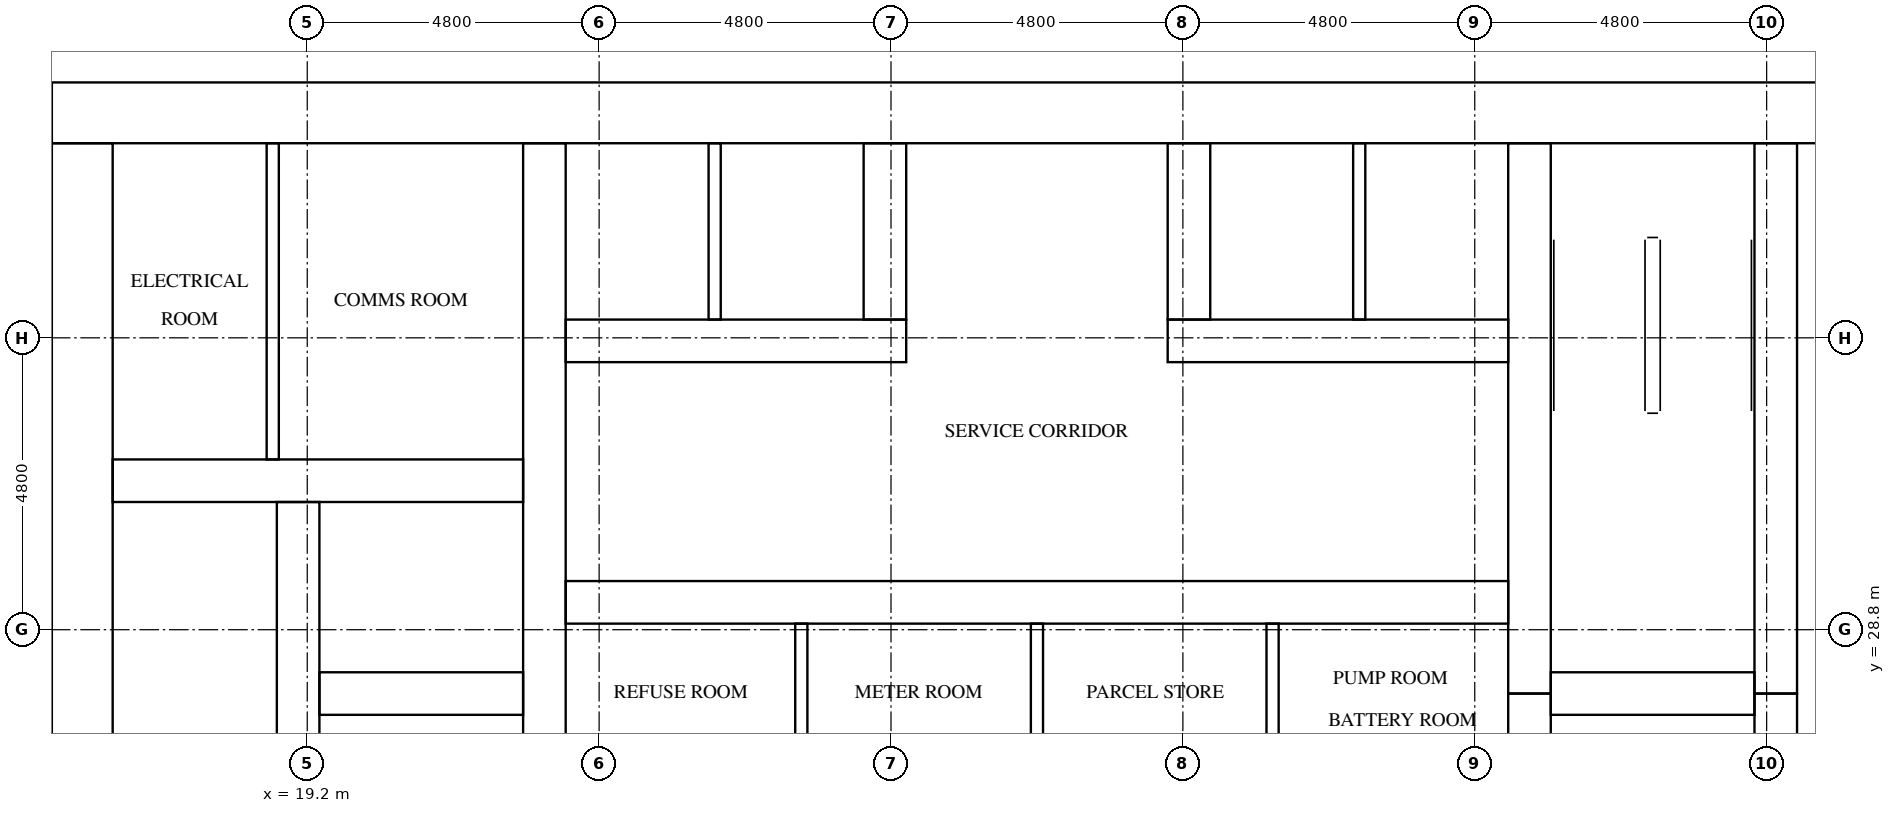
"""IFC4 building model, lengths in metres.
Left out: names, types, materials, properties, quantities, classifications, styles, units other than length and angle.
Written with IfcOpenShell. Run it as: python <this file> out.ifc"""

import sys

from ifc_helpers import new_model, si_unit, direction, frame, frame_2d, origin, place, context, subcontext, project, spatial, rectangle, extrude, element, fill, save


model = new_model("IFC4")
c1 = context("Model", 3, precision=1e-05, world=origin(), true_north=direction((0.0, 1.0)))
c2 = subcontext(c1, "Body", "Model", "MODEL_VIEW")
j1 = project(units=[si_unit("LENGTHUNIT", "METRE"), si_unit("PLANEANGLEUNIT", "RADIAN")], contexts=[c1])
p1 = place(None, origin())
s1 = spatial("IfcSite", under=j1, at=p1, CompositionType="ELEMENT")
p2 = place(p1, origin())
s2 = spatial("IfcBuilding", under=s1, at=p2, CompositionType="ELEMENT")
p3 = place(p2, frame((0.0, 0.0, 36.4)))
s3 = spatial("IfcBuildingStorey", under=s2, at=p3, CompositionType="ELEMENT", Elevation=36.4)
p4 = place(p3, frame((15.0, 37.3, 0.0), z_axis=(0.0, 0.0, 1.0), x_axis=(1.0, 0.0, 0.0)))
e1 = element("IfcWall", 1, at=p4, inside=s3, PredefinedType="SHEAR", context=c2, shape_type="SweptSolid", body=[
    extrude(rectangle(XDim=32.4, YDim=1.0, at=frame_2d((16.2, 0.0))), origin(), (0.0, 0.0, 1.0), 3.2),
])
p5 = place(p4, frame((15.3, 0.0, 0.0)))
e2 = element("IfcOpeningElement", 2, at=p5, cuts=e1, PredefinedType="OPENING", context=c2, shape_type="SweptSolid", body=[
    extrude(rectangle(XDim=1.8, YDim=2.1, at=frame_2d((0.9, 1.05))), frame((0.0, 0.51, 0.0), z_axis=(0.0, -1.0, 0.0), x_axis=(1.0, 0.0, 0.0)), (0.0, 0.0, 1.0), 1.02),
])
p6 = place(p4, frame((1.766, 0.0, 0.0)))
e3 = element("IfcOpeningElement", 3, at=p6, cuts=e1, PredefinedType="OPENING", context=c2, shape_type="SweptSolid", body=[
    extrude(rectangle(XDim=1.0, YDim=2.1, at=frame_2d((0.5, 1.05))), frame((0.0, 0.51, 0.0), z_axis=(0.0, -1.0, 0.0), x_axis=(1.0, 0.0, 0.0)), (0.0, 0.0, 1.0), 1.02),
])
p7 = place(p4, frame((5.241, 0.0, 0.0)))
e4 = element("IfcOpeningElement", 4, at=p7, cuts=e1, PredefinedType="OPENING", context=c2, shape_type="SweptSolid", body=[
    extrude(rectangle(XDim=1.0, YDim=2.1, at=frame_2d((0.5, 1.05))), frame((0.0, 0.51, 0.0), z_axis=(0.0, -1.0, 0.0), x_axis=(1.0, 0.0, 0.0)), (0.0, 0.0, 1.0), 1.02),
])
p8 = place(p3, frame((15.5, 16.0, 0.0), z_axis=(0.0, 0.0, 1.0), x_axis=(0.0, 1.0, 0.0)))
e5 = element("IfcWall", 5, at=p8, inside=s3, PredefinedType="SHEAR", context=c2, shape_type="SweptSolid", body=[
    extrude(rectangle(XDim=20.8, YDim=1.0, at=frame_2d((10.4, 0.0))), origin(), (0.0, 0.0, 1.0), 3.2),
])
p9 = place(p8, frame((4.76, 0.0, 0.0)))
e6 = element("IfcOpeningElement", 6, at=p9, cuts=e5, PredefinedType="OPENING", context=c2, shape_type="SweptSolid", body=[
    extrude(rectangle(XDim=1.2, YDim=2.1, at=frame_2d((0.6, 1.05))), frame((0.0, 0.51, 0.0), z_axis=(0.0, -1.0, 0.0), x_axis=(1.0, 0.0, 0.0)), (0.0, 0.0, 1.0), 1.02),
])
p10 = place(p3, frame((19.05, 16.0, 0.0), z_axis=(0.0, 0.0, 1.0), x_axis=(0.0, 1.0, 0.0)))
e7 = element("IfcWall", 7, at=p10, inside=s3, PredefinedType="SHEAR", context=c2, shape_type="SweptSolid", body=[
    extrude(rectangle(XDim=14.9, YDim=0.7, at=frame_2d((7.45, 0.0))), origin(), (0.0, 0.0, 1.0), 3.2),
])
p11 = place(p10, frame((9.45, 0.0, 0.0)))
e8 = element("IfcOpeningElement", 8, at=p11, cuts=e7, PredefinedType="OPENING", context=c2, shape_type="SweptSolid", body=[
    extrude(rectangle(XDim=1.1, YDim=2.1, at=frame_2d((0.55, 1.05))), frame((0.0, 0.36, 0.0), z_axis=(0.0, -1.0, 0.0), x_axis=(1.0, 0.0, 0.0)), (0.0, 0.0, 1.0), 0.72),
])
p12 = place(p10, frame((12.95, 0.0, 0.0)))
e9 = element("IfcOpeningElement", 9, at=p12, cuts=e7, PredefinedType="OPENING", context=c2, shape_type="SweptSolid", body=[
    extrude(rectangle(XDim=1.1, YDim=2.1, at=frame_2d((0.55, 1.05))), frame((0.0, 0.36, 0.0), z_axis=(0.0, -1.0, 0.0), x_axis=(1.0, 0.0, 0.0)), (0.0, 0.0, 1.0), 0.72),
])
p13 = place(p10, frame((0.2, 0.0, 0.0)))
e10 = element("IfcOpeningElement", 10, at=p13, cuts=e7, PredefinedType="OPENING", context=c2, shape_type="SweptSolid", body=[
    extrude(rectangle(XDim=1.2, YDim=2.1, at=frame_2d((0.6, 1.05))), frame((0.0, 0.36, 0.0), z_axis=(0.0, -1.0, 0.0), x_axis=(1.0, 0.0, 0.0)), (0.0, 0.0, 1.0), 0.72),
])
p14 = place(p3, frame((23.1, 16.0, 0.0), z_axis=(0.0, 0.0, 1.0), x_axis=(0.0, 1.0, 0.0)))
e11 = element("IfcWall", 11, at=p14, inside=s3, PredefinedType="SHEAR", context=c2, shape_type="SweptSolid", body=[
    extrude(rectangle(XDim=20.8, YDim=0.7, at=frame_2d((10.4, 0.0))), origin(), (0.0, 0.0, 1.0), 3.2),
])
p15 = place(p3, frame((39.3, 24.25, 0.0), z_axis=(0.0, 0.0, 1.0), x_axis=(0.0, 1.0, 0.0)))
e12 = element("IfcWall", 12, at=p15, inside=s3, PredefinedType="SHEAR", context=c2, shape_type="SweptSolid", body=[
    extrude(rectangle(XDim=3.5, YDim=0.7, at=frame_2d((1.75, 0.0))), origin(), (0.0, 0.0, 1.0), 3.2),
])
p16 = place(p3, frame((39.3, 27.75, 0.0), z_axis=(0.0, 0.0, 1.0), x_axis=(0.0, 1.0, 0.0)))
e13 = element("IfcWall", 13, at=p16, inside=s3, PredefinedType="SHEAR", context=c2, shape_type="SweptSolid", body=[
    extrude(rectangle(XDim=9.05, YDim=0.7, at=frame_2d((4.525, 0.0))), origin(), (0.0, 0.0, 1.0), 3.2),
])
p17 = place(p3, frame((43.35, 24.25, 0.0), z_axis=(0.0, 0.0, 1.0), x_axis=(0.0, 1.0, 0.0)))
e14 = element("IfcWall", 14, at=p17, inside=s3, PredefinedType="SHEAR", context=c2, shape_type="SweptSolid", body=[
    extrude(rectangle(XDim=3.5, YDim=0.7, at=frame_2d((1.75, 0.0))), origin(), (0.0, 0.0, 1.0), 3.2),
])
p18 = place(p17, frame((1.2, 0.0, 0.0)))
e15 = element("IfcOpeningElement", 15, at=p18, cuts=e14, PredefinedType="OPENING", context=c2, shape_type="SweptSolid", body=[
    extrude(rectangle(XDim=1.1, YDim=2.1, at=frame_2d((0.55, 1.05))), frame((0.0, 0.36, 0.0), z_axis=(0.0, -1.0, 0.0), x_axis=(1.0, 0.0, 0.0)), (0.0, 0.0, 1.0), 0.72),
])
p19 = place(p3, frame((43.35, 27.75, 0.0), z_axis=(0.0, 0.0, 1.0), x_axis=(0.0, 1.0, 0.0)))
e16 = element("IfcWall", 16, at=p19, inside=s3, PredefinedType="SHEAR", context=c2, shape_type="SweptSolid", body=[
    extrude(rectangle(XDim=9.05, YDim=0.7, at=frame_2d((4.525, 0.0))), origin(), (0.0, 0.0, 1.0), 3.2),
])
p20 = place(p19, frame((7.65, 0.0, 0.0)))
e17 = element("IfcOpeningElement", 17, at=p20, cuts=e16, PredefinedType="OPENING", context=c2, shape_type="SweptSolid", body=[
    extrude(rectangle(XDim=1.2, YDim=2.1, at=frame_2d((0.6, 1.05))), frame((0.0, 0.36, 0.0), z_axis=(0.0, -1.0, 0.0), x_axis=(1.0, 0.0, 0.0)), (0.0, 0.0, 1.0), 0.72),
])
p21 = place(p3, frame((19.4, 27.75, 0.0), z_axis=(0.0, 0.0, 1.0), x_axis=(1.0, 0.0, 0.0)))
e18 = element("IfcWall", 18, at=p21, inside=s3, PredefinedType="SHEAR", context=c2, shape_type="SweptSolid", body=[
    extrude(rectangle(XDim=3.35, YDim=0.7, at=frame_2d((1.675, 0.0))), origin(), (0.0, 0.0, 1.0), 3.2),
])
p22 = place(p3, frame((16.0, 31.25, 0.0), z_axis=(0.0, 0.0, 1.0), x_axis=(1.0, 0.0, 0.0)))
e19 = element("IfcWall", 19, at=p22, inside=s3, PredefinedType="SHEAR", context=c2, shape_type="SweptSolid", body=[
    extrude(rectangle(XDim=6.75, YDim=0.7, at=frame_2d((3.375, 0.0))), origin(), (0.0, 0.0, 1.0), 3.2),
])
p23 = place(p3, frame((39.65, 27.75, 0.0), z_axis=(0.0, 0.0, 1.0), x_axis=(1.0, 0.0, 0.0)))
e20 = element("IfcWall", 20, at=p23, inside=s3, PredefinedType="SHEAR", context=c2, shape_type="SweptSolid", body=[
    extrude(rectangle(XDim=3.35, YDim=0.7, at=frame_2d((1.675, 0.0))), origin(), (0.0, 0.0, 1.0), 3.2),
])
p24 = place(p3, frame((23.45, 29.25, 0.0), z_axis=(0.0, 0.0, 1.0), x_axis=(1.0, 0.0, 0.0)))
e21 = element("IfcWall", 21, at=p24, inside=s3, PredefinedType="SHEAR", context=c2, shape_type="SweptSolid", body=[
    extrude(rectangle(XDim=15.5, YDim=0.7, at=frame_2d((7.75, 0.0))), origin(), (0.0, 0.0, 1.0), 3.2),
])
p25 = place(p24, frame((1.387, 0.0, 0.0)))
e22 = element("IfcOpeningElement", 22, at=p25, cuts=e21, PredefinedType="OPENING", context=c2, shape_type="SweptSolid", body=[
    extrude(rectangle(XDim=1.0, YDim=2.1, at=frame_2d((0.5, 1.05))), frame((0.0, 0.36, 0.0), z_axis=(0.0, -1.0, 0.0), x_axis=(1.0, 0.0, 0.0)), (0.0, 0.0, 1.0), 0.72),
])
p26 = place(p24, frame((5.312, 0.0, 0.0)))
e23 = element("IfcOpeningElement", 23, at=p26, cuts=e21, PredefinedType="OPENING", context=c2, shape_type="SweptSolid", body=[
    extrude(rectangle(XDim=1.0, YDim=2.1, at=frame_2d((0.5, 1.05))), frame((0.0, 0.36, 0.0), z_axis=(0.0, -1.0, 0.0), x_axis=(1.0, 0.0, 0.0)), (0.0, 0.0, 1.0), 0.72),
])
p27 = place(p24, frame((9.188, 0.0, 0.0)))
e24 = element("IfcOpeningElement", 24, at=p27, cuts=e21, PredefinedType="OPENING", context=c2, shape_type="SweptSolid", body=[
    extrude(rectangle(XDim=1.0, YDim=2.1, at=frame_2d((0.5, 1.05))), frame((0.0, 0.36, 0.0), z_axis=(0.0, -1.0, 0.0), x_axis=(1.0, 0.0, 0.0)), (0.0, 0.0, 1.0), 0.72),
])
p28 = place(p24, frame((13.113, 0.0, 0.0)))
e25 = element("IfcOpeningElement", 25, at=p28, cuts=e21, PredefinedType="OPENING", context=c2, shape_type="SweptSolid", body=[
    extrude(rectangle(XDim=1.0, YDim=2.1, at=frame_2d((0.5, 1.05))), frame((0.0, 0.36, 0.0), z_axis=(0.0, -1.0, 0.0), x_axis=(1.0, 0.0, 0.0)), (0.0, 0.0, 1.0), 0.72),
])
p29 = place(p3, frame((23.45, 33.55, 0.0), z_axis=(0.0, 0.0, 1.0), x_axis=(1.0, 0.0, 0.0)))
e26 = element("IfcWall", 26, at=p29, inside=s3, PredefinedType="SHEAR", context=c2, shape_type="SweptSolid", body=[
    extrude(rectangle(XDim=5.6, YDim=0.7, at=frame_2d((2.8, 0.0))), origin(), (0.0, 0.0, 1.0), 3.2),
])
p30 = place(p3, frame((33.35, 33.55, 0.0), z_axis=(0.0, 0.0, 1.0), x_axis=(1.0, 0.0, 0.0)))
e27 = element("IfcWall", 27, at=p30, inside=s3, PredefinedType="SHEAR", context=c2, shape_type="SweptSolid", body=[
    extrude(rectangle(XDim=5.6, YDim=0.7, at=frame_2d((2.8, 0.0))), origin(), (0.0, 0.0, 1.0), 3.2),
])
for number, where, z_axis, x_axis in (
    (28, (28.7, 33.9, 0.0), (0.0, 0.0, 1.0), (0.0, 1.0, 0.0)),
    (29, (33.7, 33.9, 0.0), (0.0, 0.0, 1.0), (0.0, 1.0, 0.0)),
):
    element("IfcWall", number, at=place(p3, frame(where, z_axis=z_axis, x_axis=x_axis)), inside=s3, PredefinedType="SHEAR", context=c2, shape_type="SweptSolid", body=[
        extrude(rectangle(XDim=2.9, YDim=0.7, at=frame_2d((1.45, 0.0))), origin(), (0.0, 0.0, 1.0), 3.2),
    ])
for number, where, z_axis, x_axis in (
    (30, (25.9, 33.9, 0.0), (0.0, 0.0, 1.0), (0.0, 1.0, 0.0)),
    (31, (36.5, 33.9, 0.0), (0.0, 0.0, 1.0), (0.0, 1.0, 0.0)),
):
    element("IfcWall", number, at=place(p3, frame(where, z_axis=z_axis, x_axis=x_axis)), inside=s3, PredefinedType="SOLIDWALL", context=c2, shape_type="SweptSolid", body=[
        extrude(rectangle(XDim=2.9, YDim=0.2, at=frame_2d((1.45, 0.0))), origin(), (0.0, 0.0, 1.0), 3.2),
    ])
p31 = place(p3, frame((18.633, 31.6, 0.0), z_axis=(0.0, 0.0, 1.0), x_axis=(0.0, 1.0, 0.0)))
e32 = element("IfcWall", 32, at=p31, inside=s3, PredefinedType="PARTITIONING", context=c2, shape_type="SweptSolid", body=[
    extrude(rectangle(XDim=5.2, YDim=0.2, at=frame_2d((2.6, 0.0))), origin(), (0.0, 0.0, 1.0), 3.2),
])
for number, where, z_axis, x_axis in (
    (33, (27.325, 26.5, 0.0), (0.0, 0.0, 1.0), (0.0, 1.0, 0.0)),
    (34, (31.2, 26.5, 0.0), (0.0, 0.0, 1.0), (0.0, 1.0, 0.0)),
    (35, (35.075, 26.5, 0.0), (0.0, 0.0, 1.0), (0.0, 1.0, 0.0)),
):
    element("IfcWall", number, at=place(p3, frame(where, z_axis=z_axis, x_axis=x_axis)), inside=s3, PredefinedType="PARTITIONING", context=c2, shape_type="SweptSolid", body=[
        extrude(rectangle(XDim=2.4, YDim=0.2, at=frame_2d((1.2, 0.0))), origin(), (0.0, 0.0, 1.0), 3.2),
    ])
p32 = place(p12, origin())
e36 = element("IfcDoor", 36, at=p32, inside=s3, OperationType="DOUBLE_DOOR_SLIDING", PredefinedType="DOOR", context=c2, shape_type="SweptSolid", body=[
    extrude(rectangle(XDim=1.1, YDim=2.1, at=frame_2d((0.55, 1.05))), frame((0.0, 0.025, 0.0), z_axis=(0.0, -1.0, 0.0), x_axis=(1.0, 0.0, 0.0)), (0.0, 0.0, 1.0), 0.05),
])
fill(e9, e36)
p33 = place(p20, origin())
e37 = element("IfcDoor", 37, at=p33, inside=s3, OperationType="SINGLE_SWING_RIGHT", PredefinedType="DOOR", context=c2, shape_type="SweptSolid", body=[
    extrude(rectangle(XDim=1.2, YDim=2.1, at=frame_2d((0.6, 1.05))), frame((0.0, 0.025, 0.0), z_axis=(0.0, -1.0, 0.0), x_axis=(1.0, 0.0, 0.0)), (0.0, 0.0, 1.0), 0.05),
])
fill(e17, e37)
p34 = place(p5, origin())
e38 = element("IfcDoor", 38, at=p34, inside=s3, OperationType="DOUBLE_DOOR_SINGLE_SWING", PredefinedType="DOOR", context=c2, shape_type="SweptSolid", body=[
    extrude(rectangle(XDim=1.8, YDim=2.1, at=frame_2d((0.9, 1.05))), frame((0.0, 0.025, 0.0), z_axis=(0.0, -1.0, 0.0), x_axis=(1.0, 0.0, 0.0)), (0.0, 0.0, 1.0), 0.05),
])
fill(e2, e38)
p35 = place(p6, origin())
e39 = element("IfcDoor", 39, at=p35, inside=s3, OperationType="SINGLE_SWING_LEFT", PredefinedType="DOOR", context=c2, shape_type="SweptSolid", body=[
    extrude(rectangle(XDim=1.0, YDim=2.1, at=frame_2d((0.5, 1.05))), frame((0.0, 0.025, 0.0), z_axis=(0.0, -1.0, 0.0), x_axis=(1.0, 0.0, 0.0)), (0.0, 0.0, 1.0), 0.05),
])
fill(e3, e39)
p36 = place(p7, origin())
e40 = element("IfcDoor", 40, at=p36, inside=s3, OperationType="SINGLE_SWING_RIGHT", PredefinedType="DOOR", context=c2, shape_type="SweptSolid", body=[
    extrude(rectangle(XDim=1.0, YDim=2.1, at=frame_2d((0.5, 1.05))), frame((0.0, 0.025, 0.0), z_axis=(0.0, -1.0, 0.0), x_axis=(1.0, 0.0, 0.0)), (0.0, 0.0, 1.0), 0.05),
])
fill(e4, e40)
p37 = place(p25, origin())
e41 = element("IfcDoor", 41, at=p37, inside=s3, OperationType="SINGLE_SWING_LEFT", PredefinedType="DOOR", context=c2, shape_type="SweptSolid", body=[
    extrude(rectangle(XDim=1.0, YDim=2.1, at=frame_2d((0.5, 1.05))), frame((0.0, 0.025, 0.0), z_axis=(0.0, -1.0, 0.0), x_axis=(1.0, 0.0, 0.0)), (0.0, 0.0, 1.0), 0.05),
])
fill(e22, e41)
p38 = place(p26, origin())
e42 = element("IfcDoor", 42, at=p38, inside=s3, OperationType="SINGLE_SWING_RIGHT", PredefinedType="DOOR", context=c2, shape_type="SweptSolid", body=[
    extrude(rectangle(XDim=1.0, YDim=2.1, at=frame_2d((0.5, 1.05))), frame((0.0, 0.025, 0.0), z_axis=(0.0, -1.0, 0.0), x_axis=(1.0, 0.0, 0.0)), (0.0, 0.0, 1.0), 0.05),
])
fill(e23, e42)
p39 = place(p27, origin())
e43 = element("IfcDoor", 43, at=p39, inside=s3, OperationType="SINGLE_SWING_LEFT", PredefinedType="DOOR", context=c2, shape_type="SweptSolid", body=[
    extrude(rectangle(XDim=1.0, YDim=2.1, at=frame_2d((0.5, 1.05))), frame((0.0, 0.025, 0.0), z_axis=(0.0, -1.0, 0.0), x_axis=(1.0, 0.0, 0.0)), (0.0, 0.0, 1.0), 0.05),
])
fill(e24, e43)
p40 = place(p28, origin())
e44 = element("IfcDoor", 44, at=p40, inside=s3, OperationType="SINGLE_SWING_RIGHT", PredefinedType="DOOR", context=c2, shape_type="SweptSolid", body=[
    extrude(rectangle(XDim=1.0, YDim=2.1, at=frame_2d((0.5, 1.05))), frame((0.0, 0.025, 0.0), z_axis=(0.0, -1.0, 0.0), x_axis=(1.0, 0.0, 0.0)), (0.0, 0.0, 1.0), 0.05),
])
fill(e25, e44)
save(model, sys.argv[1])
